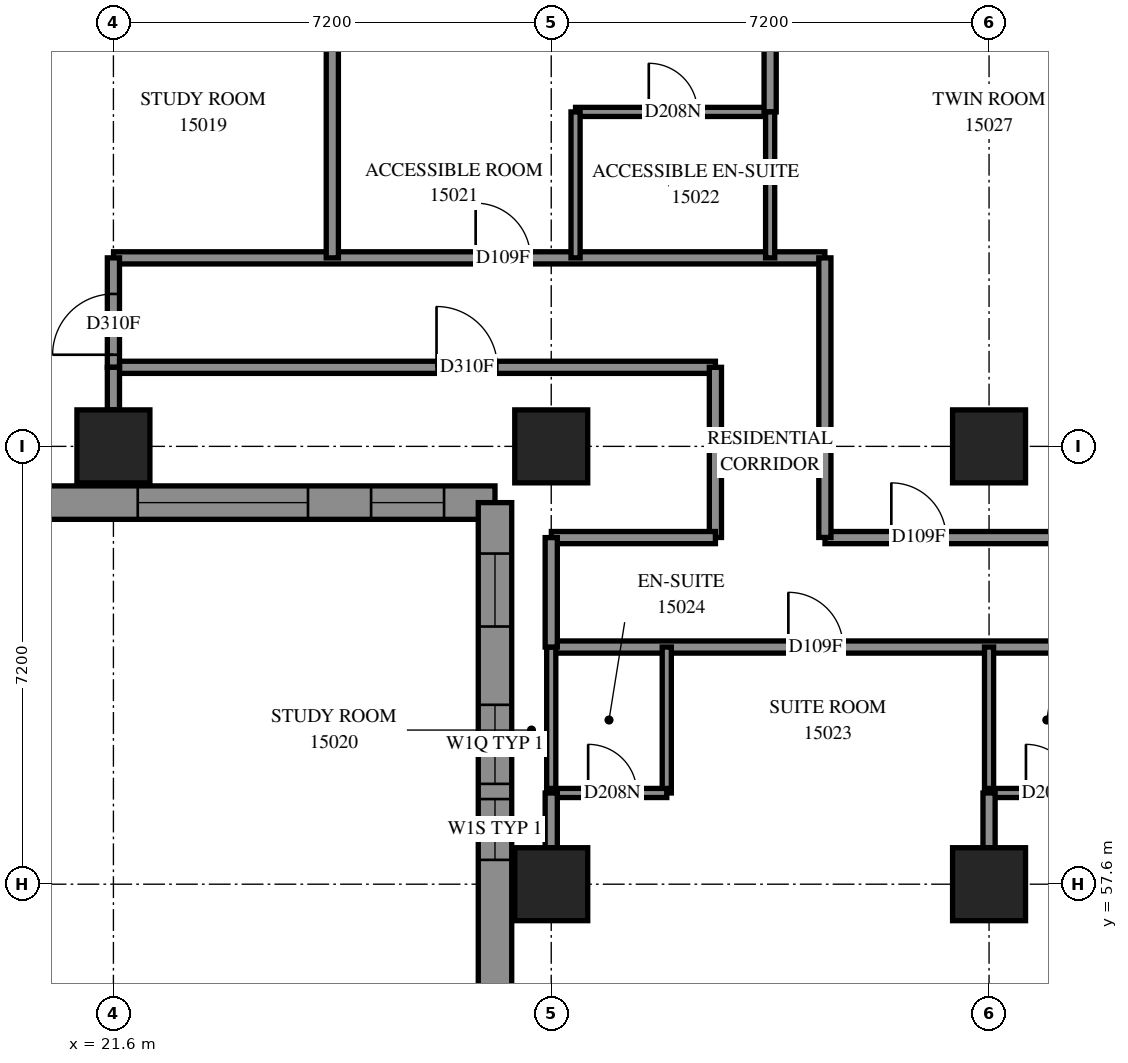
"""IFC4 building model, lengths in metres.
Left out: names, types, materials, properties, quantities, classifications, styles, units other than length and angle.
Written with IfcOpenShell. Run it as: python <this file> out.ifc"""

import sys

from ifc_helpers import new_model, si_unit, direction, frame, frame_2d, origin, origin_2d, place, context, subcontext, project, spatial, polyline, rectangle, outline, extrude, element, fill, save


model = new_model("IFC4")
c1 = context("Model", 3, precision=1e-05, world=origin(), true_north=direction((0.0, 1.0)))
c2 = subcontext(c1, "Body", "Model", "MODEL_VIEW")
j1 = project(units=[si_unit("LENGTHUNIT", "METRE"), si_unit("PLANEANGLEUNIT", "RADIAN")], contexts=[c1])
p1 = place(None, origin())
s1 = spatial("IfcSite", under=j1, at=p1, CompositionType="ELEMENT")
p2 = place(p1, origin())
s2 = spatial("IfcBuilding", under=s1, at=p2, CompositionType="ELEMENT")
p3 = place(p2, frame((0.0, 0.0, 57.6)))
s3 = spatial("IfcBuildingStorey", under=s2, at=p3, CompositionType="ELEMENT", Elevation=57.6)
for number, where, z_axis, x_axis in (
    (1, (21.6, 64.8, 0.0), (0.0, 0.0, 1.0), (1.0, 0.0, 0.0)),
    (2, (28.8, 57.6, 0.0), (0.0, 0.0, 1.0), (1.0, 0.0, 0.0)),
    (3, (28.8, 64.8, 0.0), (0.0, 0.0, 1.0), (1.0, 0.0, 0.0)),
    (4, (36.0, 57.6, 0.0), (0.0, 0.0, 1.0), (1.0, 0.0, 0.0)),
    (5, (36.0, 64.8, 0.0), (0.0, 0.0, 1.0), (1.0, 0.0, 0.0)),
):
    element("IfcColumn", number, at=place(p3, frame(where, z_axis=z_axis, x_axis=x_axis)), inside=s3, PredefinedType="COLUMN", context=c2, shape_type="SweptSolid", body=[
        extrude(rectangle(XDim=1.2, YDim=1.2, at=origin_2d()), origin(), (0.0, 0.0, 1.0), 3.1),
    ])
p4 = place(p3, frame((19.503, 63.875, 0.0), z_axis=(0.0, 0.0, 1.0), x_axis=(1.0, 0.0, 0.0)))
e6 = element("IfcWall", 6, at=p4, inside=s3, PredefinedType="SOLIDWALL", context=c2, shape_type="SweptSolid", body=[
    extrude(outline(polyline([(-0.275, -0.275), (8.097, -0.275), (8.647, 0.275), (0.275, 0.275), (-0.275, -0.275)])), origin(), (0.0, 0.0, 1.0), 3.1),
])
p5 = place(p4, frame((2.497, 0.0, 0.5)))
e7 = element("IfcOpeningElement", 7, at=p5, cuts=e6, PredefinedType="OPENING", context=c2, shape_type="SweptSolid", body=[
    extrude(rectangle(XDim=2.8, YDim=2.45, at=frame_2d((1.4, 1.225))), frame((0.0, 0.285, 0.0), z_axis=(0.0, -1.0, 0.0), x_axis=(1.0, 0.0, 0.0)), (0.0, 0.0, 1.0), 0.57),
])
p6 = place(p4, frame((6.335, 0.0, 0.5)))
e8 = element("IfcOpeningElement", 8, at=p6, cuts=e6, PredefinedType="OPENING", context=c2, shape_type="SweptSolid", body=[
    extrude(rectangle(XDim=1.2, YDim=2.45, at=frame_2d((0.6, 1.225))), frame((0.0, 0.285, 0.0), z_axis=(0.0, -1.0, 0.0), x_axis=(1.0, 0.0, 0.0)), (0.0, 0.0, 1.0), 0.57),
])
p7 = place(p3, frame((27.875, 63.875, 0.0), z_axis=(0.0, 0.0, 1.0), x_axis=(0.0, -1.0, 0.0)))
e9 = element("IfcWall", 9, at=p7, inside=s3, PredefinedType="SOLIDWALL", context=c2, shape_type="SweptSolid", body=[
    extrude(outline(polyline([(0.275, -0.275), (8.647, -0.275), (8.097, 0.275), (-0.275, 0.275), (0.275, -0.275)])), origin(), (0.0, 0.0, 1.0), 3.1),
])
p8 = place(p7, frame((0.838, 0.0, 0.5)))
e10 = element("IfcOpeningElement", 10, at=p8, cuts=e9, PredefinedType="OPENING", context=c2, shape_type="SweptSolid", body=[
    extrude(rectangle(XDim=1.2, YDim=2.45, at=frame_2d((0.6, 1.225))), frame((0.0, 0.285, 0.0), z_axis=(0.0, -1.0, 0.0), x_axis=(1.0, 0.0, 0.0)), (0.0, 0.0, 1.0), 0.57),
])
p9 = place(p7, frame((3.325, 0.0, 0.45)))
e11 = element("IfcOpeningElement", 11, at=p9, cuts=e9, PredefinedType="OPENING", context=c2, shape_type="SweptSolid", body=[
    extrude(rectangle(XDim=1.3, YDim=2.5, at=frame_2d((0.65, 1.25))), frame((0.0, 0.285, 0.0), z_axis=(0.0, -1.0, 0.0), x_axis=(1.0, 0.0, 0.0)), (0.0, 0.0, 1.0), 0.57),
])
p10 = place(p7, frame((4.875, 0.0, 0.45)))
e12 = element("IfcOpeningElement", 12, at=p10, cuts=e9, PredefinedType="OPENING", context=c2, shape_type="SweptSolid", body=[
    extrude(rectangle(XDim=1.0, YDim=2.5, at=frame_2d((0.5, 1.25))), frame((0.0, 0.285, 0.0), z_axis=(0.0, -1.0, 0.0), x_axis=(1.0, 0.0, 0.0)), (0.0, 0.0, 1.0), 0.57),
])
p11 = place(p3, frame((28.8, 61.5, 0.0), z_axis=(0.0, 0.0, 1.0), x_axis=(1.0, 0.0, 0.0)))
e13 = element("IfcWall", 13, at=p11, inside=s3, PredefinedType="PARTITIONING", context=c2, shape_type="SweptSolid", body=[
    extrude(rectangle(XDim=24.3, YDim=0.2, at=frame_2d((12.15, 0.0))), origin(), (0.0, 0.0, 1.0), 3.1),
])
p12 = place(p11, frame((3.899, 0.0, 0.0)))
e14 = element("IfcOpeningElement", 14, at=p12, cuts=e13, PredefinedType="OPENING", context=c2, shape_type="SweptSolid", body=[
    extrude(rectangle(XDim=0.9, YDim=2.1, at=frame_2d((0.45, 1.05))), frame((0.0, 0.11, 0.0), z_axis=(0.0, -1.0, 0.0), x_axis=(1.0, 0.0, 0.0)), (0.0, 0.0, 1.0), 0.22),
])
p13 = place(p11, frame((9.5, 0.0, 0.0)))
e15 = element("IfcOpeningElement", 15, at=p13, cuts=e13, PredefinedType="OPENING", context=c2, shape_type="SweptSolid", body=[
    extrude(rectangle(XDim=0.9, YDim=2.1, at=frame_2d((0.45, 1.05))), frame((0.0, 0.11, 0.0), z_axis=(0.0, -1.0, 0.0), x_axis=(1.0, 0.0, 0.0)), (0.0, 0.0, 1.0), 0.22),
])
p14 = place(p11, frame((11.307, 0.0, 0.0)))
e16 = element("IfcOpeningElement", 16, at=p14, cuts=e13, PredefinedType="OPENING", context=c2, shape_type="SweptSolid", body=[
    extrude(rectangle(XDim=1.0, YDim=2.1, at=frame_2d((0.5, 1.05))), frame((0.0, 0.11, 0.0), z_axis=(0.0, -1.0, 0.0), x_axis=(1.0, 0.0, 0.0)), (0.0, 0.0, 1.0), 0.22),
])
p15 = place(p11, frame((16.7, 0.0, 0.0)))
e17 = element("IfcOpeningElement", 17, at=p15, cuts=e13, PredefinedType="OPENING", context=c2, shape_type="SweptSolid", body=[
    extrude(rectangle(XDim=0.9, YDim=2.1, at=frame_2d((0.45, 1.05))), frame((0.0, 0.11, 0.0), z_axis=(0.0, -1.0, 0.0), x_axis=(1.0, 0.0, 0.0)), (0.0, 0.0, 1.0), 0.22),
])
p16 = place(p11, frame((18.508, 0.0, 0.0)))
e18 = element("IfcOpeningElement", 18, at=p16, cuts=e13, PredefinedType="OPENING", context=c2, shape_type="SweptSolid", body=[
    extrude(rectangle(XDim=1.0, YDim=2.1, at=frame_2d((0.5, 1.05))), frame((0.0, 0.11, 0.0), z_axis=(0.0, -1.0, 0.0), x_axis=(1.0, 0.0, 0.0)), (0.0, 0.0, 1.0), 0.22),
])
p17 = place(p11, frame((23.033, 0.0, 0.0)))
e19 = element("IfcOpeningElement", 19, at=p17, cuts=e13, PredefinedType="OPENING", context=c2, shape_type="SweptSolid", body=[
    extrude(rectangle(XDim=1.0, YDim=2.1, at=frame_2d((0.5, 1.05))), frame((0.0, 0.11, 0.0), z_axis=(0.0, -1.0, 0.0), x_axis=(1.0, 0.0, 0.0)), (0.0, 0.0, 1.0), 0.22),
])
p18 = place(p3, frame((33.302, 63.3, 0.0), z_axis=(0.0, 0.0, 1.0), x_axis=(1.0, 0.0, 0.0)))
e20 = element("IfcWall", 20, at=p18, inside=s3, PredefinedType="PARTITIONING", context=c2, shape_type="SweptSolid", body=[
    extrude(rectangle(XDim=21.798, YDim=0.2, at=frame_2d((10.899, 0.0))), origin(), (0.0, 0.0, 1.0), 3.1),
])
p19 = place(p18, frame((1.091, 0.0, 0.0)))
e21 = element("IfcOpeningElement", 21, at=p19, cuts=e20, PredefinedType="OPENING", context=c2, shape_type="SweptSolid", body=[
    extrude(rectangle(XDim=0.9, YDim=2.1, at=frame_2d((0.45, 1.05))), frame((0.0, 0.11, 0.0), z_axis=(0.0, -1.0, 0.0), x_axis=(1.0, 0.0, 0.0)), (0.0, 0.0, 1.0), 0.22),
])
p20 = place(p18, frame((8.248, 0.0, 0.0)))
e22 = element("IfcOpeningElement", 22, at=p20, cuts=e20, PredefinedType="OPENING", context=c2, shape_type="SweptSolid", body=[
    extrude(rectangle(XDim=0.9, YDim=2.1, at=frame_2d((0.45, 1.05))), frame((0.0, 0.11, 0.0), z_axis=(0.0, -1.0, 0.0), x_axis=(1.0, 0.0, 0.0)), (0.0, 0.0, 1.0), 0.22),
])
p21 = place(p18, frame((15.448, 0.0, 0.0)))
e23 = element("IfcOpeningElement", 23, at=p21, cuts=e20, PredefinedType="OPENING", context=c2, shape_type="SweptSolid", body=[
    extrude(rectangle(XDim=0.9, YDim=2.1, at=frame_2d((0.45, 1.05))), frame((0.0, 0.11, 0.0), z_axis=(0.0, -1.0, 0.0), x_axis=(1.0, 0.0, 0.0)), (0.0, 0.0, 1.0), 0.22),
])
p22 = place(p3, frame((21.602, 67.9, 0.0), z_axis=(0.0, 0.0, 1.0), x_axis=(1.0, 0.0, 0.0)))
e24 = element("IfcWall", 24, at=p22, inside=s3, PredefinedType="PARTITIONING", context=c2, shape_type="SweptSolid", body=[
    extrude(rectangle(XDim=11.698, YDim=0.2, at=frame_2d((5.849, 0.0))), origin(), (0.0, 0.0, 1.0), 3.1),
])
p23 = place(p22, frame((5.955, 0.0, 0.0)))
e25 = element("IfcOpeningElement", 25, at=p23, cuts=e24, PredefinedType="OPENING", context=c2, shape_type="SweptSolid", body=[
    extrude(rectangle(XDim=0.9, YDim=2.1, at=frame_2d((0.45, 1.05))), frame((0.0, 0.11, 0.0), z_axis=(0.0, -1.0, 0.0), x_axis=(1.0, 0.0, 0.0)), (0.0, 0.0, 1.0), 0.22),
])
p24 = place(p3, frame((21.6, 66.1, 0.0), z_axis=(0.0, 0.0, 1.0), x_axis=(1.0, 0.0, 0.0)))
e26 = element("IfcWall", 26, at=p24, inside=s3, PredefinedType="PARTITIONING", context=c2, shape_type="SweptSolid", body=[
    extrude(rectangle(XDim=9.9, YDim=0.2, at=frame_2d((4.95, 0.0))), origin(), (0.0, 0.0, 1.0), 3.1),
])
p25 = place(p24, frame((5.314, 0.0, 0.0)))
e27 = element("IfcOpeningElement", 27, at=p25, cuts=e26, PredefinedType="OPENING", context=c2, shape_type="SweptSolid", body=[
    extrude(rectangle(XDim=1.0, YDim=2.1, at=frame_2d((0.5, 1.05))), frame((0.0, 0.11, 0.0), z_axis=(0.0, -1.0, 0.0), x_axis=(1.0, 0.0, 0.0)), (0.0, 0.0, 1.0), 0.22),
])
p26 = place(p3, frame((25.2, 67.9, 0.0), z_axis=(0.0, 0.0, 1.0), x_axis=(0.0, 1.0, 0.0)))
e28 = element("IfcWall", 28, at=p26, inside=s3, PredefinedType="PARTITIONING", context=c2, shape_type="SweptSolid", body=[
    extrude(rectangle(XDim=5.069, YDim=0.2, at=frame_2d((2.534, 0.0))), origin(), (0.0, 0.0, 1.0), 3.1),
])
p27 = place(p3, frame((33.3, 63.302, 0.0), z_axis=(0.0, 0.0, 1.0), x_axis=(0.0, 1.0, 0.0)))
e29 = element("IfcWall", 29, at=p27, inside=s3, PredefinedType="PARTITIONING", context=c2, shape_type="SweptSolid", body=[
    extrude(rectangle(XDim=4.598, YDim=0.2, at=frame_2d((2.299, 0.0))), origin(), (0.0, 0.0, 1.0), 3.1),
])
p28 = place(p3, frame((29.2, 70.3, 0.0), z_axis=(0.0, 0.0, 1.0), x_axis=(1.0, 0.0, 0.0)))
e30 = element("IfcWall", 30, at=p28, inside=s3, PredefinedType="PARTITIONING", context=c2, shape_type="SweptSolid", body=[
    extrude(rectangle(XDim=3.2, YDim=0.15, at=frame_2d((1.6, 0.0))), origin(), (0.0, 0.0, 1.0), 3.1),
])
p29 = place(p28, frame((1.204, 0.0, 0.0)))
e31 = element("IfcOpeningElement", 31, at=p29, cuts=e30, PredefinedType="OPENING", context=c2, shape_type="SweptSolid", body=[
    extrude(rectangle(XDim=0.8, YDim=2.1, at=frame_2d((0.4, 1.05))), frame((0.0, 0.085, 0.0), z_axis=(0.0, -1.0, 0.0), x_axis=(1.0, 0.0, 0.0)), (0.0, 0.0, 1.0), 0.17),
])
p30 = place(p3, frame((31.5, 63.302, 0.0), z_axis=(0.0, 0.0, 1.0), x_axis=(0.0, 1.0, 0.0)))
e32 = element("IfcWall", 32, at=p30, inside=s3, PredefinedType="PARTITIONING", context=c2, shape_type="SweptSolid", body=[
    extrude(rectangle(XDim=2.798, YDim=0.2, at=frame_2d((1.399, 0.0))), origin(), (0.0, 0.0, 1.0), 3.1),
])
p31 = place(p3, frame((28.802, 63.3, 0.0), z_axis=(0.0, 0.0, 1.0), x_axis=(1.0, 0.0, 0.0)))
e33 = element("IfcWall", 33, at=p31, inside=s3, PredefinedType="PARTITIONING", context=c2, shape_type="SweptSolid", body=[
    extrude(rectangle(XDim=2.698, YDim=0.2, at=frame_2d((1.349, 0.0))), origin(), (0.0, 0.0, 1.0), 3.1),
])
p32 = place(p3, frame((32.4, 70.3, 0.0), z_axis=(0.0, 0.0, 1.0), x_axis=(0.0, 1.0, 0.0)))
e34 = element("IfcWall", 34, at=p32, inside=s3, PredefinedType="PARTITIONING", context=c2, shape_type="SweptSolid", body=[
    extrude(rectangle(XDim=2.606, YDim=0.2, at=frame_2d((1.303, 0.0))), origin(), (0.0, 0.0, 1.0), 3.1),
])
p33 = place(p3, frame((30.7, 59.1, 0.0), z_axis=(0.0, 0.0, 1.0), x_axis=(0.0, 1.0, 0.0)))
e35 = element("IfcWall", 35, at=p33, inside=s3, PredefinedType="PARTITIONING", context=c2, shape_type="SweptSolid", body=[
    extrude(rectangle(XDim=2.4, YDim=0.15, at=frame_2d((1.2, 0.0))), origin(), (0.0, 0.0, 1.0), 3.1),
])
p34 = place(p3, frame((28.8, 59.1, 0.0), z_axis=(0.0, 0.0, 1.0), x_axis=(0.0, 1.0, 0.0)))
e36 = element("IfcWall", 36, at=p34, inside=s3, PredefinedType="PARTITIONING", context=c2, shape_type="SweptSolid", body=[
    extrude(rectangle(XDim=2.4, YDim=0.15, at=frame_2d((1.2, 0.0))), origin(), (0.0, 0.0, 1.0), 2.6),
])
for number, where, z_axis, x_axis in (
    (37, (36.0, 59.1, 0.0), (0.0, 0.0, 1.0), (0.0, 1.0, 0.0)),
    (38, (29.2, 67.9, 0.0), (0.0, 0.0, 1.0), (0.0, 1.0, 0.0)),
    (39, (32.4, 67.9, 0.0), (0.0, 0.0, 1.0), (0.0, 1.0, 0.0)),
):
    element("IfcWall", number, at=place(p3, frame(where, z_axis=z_axis, x_axis=x_axis)), inside=s3, PredefinedType="PARTITIONING", context=c2, shape_type="SweptSolid", body=[
        extrude(rectangle(XDim=2.4, YDim=0.15, at=frame_2d((1.2, 0.0))), origin(), (0.0, 0.0, 1.0), 3.1),
    ])
p35 = place(p3, frame((28.8, 59.1, 0.0), z_axis=(0.0, 0.0, 1.0), x_axis=(1.0, 0.0, 0.0)))
e40 = element("IfcWall", 40, at=p35, inside=s3, PredefinedType="PARTITIONING", context=c2, shape_type="SweptSolid", body=[
    extrude(rectangle(XDim=1.9, YDim=0.15, at=frame_2d((0.95, 0.0))), origin(), (0.0, 0.0, 1.0), 3.1),
])
p36 = place(p35, frame((0.607, 0.0, 0.0)))
e41 = element("IfcOpeningElement", 41, at=p36, cuts=e40, PredefinedType="OPENING", context=c2, shape_type="SweptSolid", body=[
    extrude(rectangle(XDim=0.8, YDim=2.1, at=frame_2d((0.4, 1.05))), frame((0.0, 0.085, 0.0), z_axis=(0.0, -1.0, 0.0), x_axis=(1.0, 0.0, 0.0)), (0.0, 0.0, 1.0), 0.17),
])
p37 = place(p3, frame((36.0, 59.1, 0.0), z_axis=(0.0, 0.0, 1.0), x_axis=(1.0, 0.0, 0.0)))
e42 = element("IfcWall", 42, at=p37, inside=s3, PredefinedType="PARTITIONING", context=c2, shape_type="SweptSolid", body=[
    extrude(rectangle(XDim=1.9, YDim=0.15, at=frame_2d((0.95, 0.0))), origin(), (0.0, 0.0, 1.0), 3.1),
])
p38 = place(p37, frame((0.607, 0.0, 0.0)))
e43 = element("IfcOpeningElement", 43, at=p38, cuts=e42, PredefinedType="OPENING", context=c2, shape_type="SweptSolid", body=[
    extrude(rectangle(XDim=0.8, YDim=2.1, at=frame_2d((0.4, 1.05))), frame((0.0, 0.085, 0.0), z_axis=(0.0, -1.0, 0.0), x_axis=(1.0, 0.0, 0.0)), (0.0, 0.0, 1.0), 0.17),
])
p39 = place(p3, frame((21.6, 66.1, 0.0), z_axis=(0.0, 0.0, 1.0), x_axis=(0.0, 1.0, 0.0)))
e44 = element("IfcWall", 44, at=p39, inside=s3, PredefinedType="PARTITIONING", context=c2, shape_type="SweptSolid", body=[
    extrude(rectangle(XDim=1.8, YDim=0.2, at=frame_2d((0.9, 0.0))), origin(), (0.0, 0.0, 1.0), 2.6),
])
p40 = place(p39, frame((0.207, 0.0, 0.0)))
e45 = element("IfcOpeningElement", 45, at=p40, cuts=e44, PredefinedType="OPENING", context=c2, shape_type="SweptSolid", body=[
    extrude(rectangle(XDim=1.0, YDim=2.1, at=frame_2d((0.5, 1.05))), frame((0.0, 0.11, 0.0), z_axis=(0.0, -1.0, 0.0), x_axis=(1.0, 0.0, 0.0)), (0.0, 0.0, 1.0), 0.22),
])
p41 = place(p3, frame((28.8, 61.5, 0.0), z_axis=(0.0, 0.0, 1.0), x_axis=(0.0, 1.0, 0.0)))
e46 = element("IfcWall", 46, at=p41, inside=s3, PredefinedType="PARTITIONING", context=c2, shape_type="SweptSolid", body=[
    extrude(rectangle(XDim=1.8, YDim=0.2, at=frame_2d((0.9, 0.0))), origin(), (0.0, 0.0, 1.0), 2.6),
])
p42 = place(p3, frame((28.8, 58.2, 0.0), z_axis=(0.0, 0.0, 1.0), x_axis=(0.0, 1.0, 0.0)))
e47 = element("IfcWall", 47, at=p42, inside=s3, PredefinedType="PARTITIONING", context=c2, shape_type="SweptSolid", body=[
    extrude(rectangle(XDim=0.9, YDim=0.2, at=frame_2d((0.45, 0.0))), origin(), (0.0, 0.0, 1.0), 2.6),
])
p43 = place(p3, frame((36.0, 58.2, 0.0), z_axis=(0.0, 0.0, 1.0), x_axis=(0.0, 1.0, 0.0)))
e48 = element("IfcWall", 48, at=p43, inside=s3, PredefinedType="PARTITIONING", context=c2, shape_type="SweptSolid", body=[
    extrude(rectangle(XDim=0.9, YDim=0.2, at=frame_2d((0.45, 0.0))), origin(), (0.0, 0.0, 1.0), 3.1),
])
p44 = place(p3, frame((21.6, 65.4, 0.0), z_axis=(0.0, 0.0, 1.0), x_axis=(0.0, 1.0, 0.0)))
e49 = element("IfcWall", 49, at=p44, inside=s3, PredefinedType="PARTITIONING", context=c2, shape_type="SweptSolid", body=[
    extrude(rectangle(XDim=0.7, YDim=0.2, at=frame_2d((0.35, 0.0))), origin(), (0.0, 0.0, 1.0), 2.6),
])
p45 = place(p5, origin())
e50 = element("IfcWindow", 50, at=p45, inside=s3, PartitioningType="SINGLE_PANEL", PredefinedType="WINDOW", context=c2, shape_type="SweptSolid", body=[
    extrude(rectangle(XDim=2.8, YDim=2.45, at=frame_2d((1.4, 1.225))), frame((0.0, 0.155, 0.0), z_axis=(0.0, -1.0, 0.0), x_axis=(1.0, 0.0, 0.0)), (0.0, 0.0, 1.0), 0.06),
])
fill(e7, e50)
p46 = place(p6, origin())
e51 = element("IfcWindow", 51, at=p46, inside=s3, PartitioningType="SINGLE_PANEL", PredefinedType="WINDOW", context=c2, shape_type="SweptSolid", body=[
    extrude(rectangle(XDim=1.2, YDim=2.45, at=frame_2d((0.6, 1.225))), frame((0.0, 0.155, 0.0), z_axis=(0.0, -1.0, 0.0), x_axis=(1.0, 0.0, 0.0)), (0.0, 0.0, 1.0), 0.06),
])
fill(e8, e51)
p47 = place(p8, origin())
e52 = element("IfcWindow", 52, at=p47, inside=s3, PartitioningType="SINGLE_PANEL", PredefinedType="WINDOW", context=c2, shape_type="SweptSolid", body=[
    extrude(rectangle(XDim=1.2, YDim=2.45, at=frame_2d((0.6, 1.225))), frame((0.0, 0.155, 0.0), z_axis=(0.0, -1.0, 0.0), x_axis=(1.0, 0.0, 0.0)), (0.0, 0.0, 1.0), 0.06),
])
fill(e10, e52)
p48 = place(p40, origin())
e53 = element("IfcDoor", 53, at=p48, inside=s3, OperationType="SINGLE_SWING_RIGHT", PredefinedType="DOOR", context=c2, shape_type="SweptSolid", body=[
    extrude(rectangle(XDim=1.0, YDim=2.1, at=frame_2d((0.5, 1.05))), frame((0.0, 0.025, 0.0), z_axis=(0.0, -1.0, 0.0), x_axis=(1.0, 0.0, 0.0)), (0.0, 0.0, 1.0), 0.05),
])
fill(e45, e53)
p49 = place(p25, origin())
e54 = element("IfcDoor", 54, at=p49, inside=s3, OperationType="SINGLE_SWING_LEFT", PredefinedType="DOOR", context=c2, shape_type="SweptSolid", body=[
    extrude(rectangle(XDim=1.0, YDim=2.1, at=frame_2d((0.5, 1.05))), frame((0.0, 0.025, 0.0), z_axis=(0.0, -1.0, 0.0), x_axis=(1.0, 0.0, 0.0)), (0.0, 0.0, 1.0), 0.05),
])
fill(e27, e54)
p50 = place(p23, origin())
e55 = element("IfcDoor", 55, at=p50, inside=s3, OperationType="SINGLE_SWING_LEFT", PredefinedType="DOOR", context=c2, shape_type="SweptSolid", body=[
    extrude(rectangle(XDim=0.9, YDim=2.1, at=frame_2d((0.45, 1.05))), frame((0.0, 0.025, 0.0), z_axis=(0.0, -1.0, 0.0), x_axis=(1.0, 0.0, 0.0)), (0.0, 0.0, 1.0), 0.05),
])
fill(e25, e55)
p51 = place(p29, origin())
e56 = element("IfcDoor", 56, at=p51, inside=s3, OperationType="SINGLE_SWING_RIGHT", PredefinedType="DOOR", context=c2, shape_type="SweptSolid", body=[
    extrude(rectangle(XDim=0.8, YDim=2.1, at=frame_2d((0.4, 1.05))), frame((0.0, 0.025, 0.0), z_axis=(0.0, -1.0, 0.0), x_axis=(1.0, 0.0, 0.0)), (0.0, 0.0, 1.0), 0.05),
])
fill(e31, e56)
p52 = place(p12, origin())
e57 = element("IfcDoor", 57, at=p52, inside=s3, OperationType="SINGLE_SWING_LEFT", PredefinedType="DOOR", context=c2, shape_type="SweptSolid", body=[
    extrude(rectangle(XDim=0.9, YDim=2.1, at=frame_2d((0.45, 1.05))), frame((0.0, 0.025, 0.0), z_axis=(0.0, -1.0, 0.0), x_axis=(1.0, 0.0, 0.0)), (0.0, 0.0, 1.0), 0.05),
])
fill(e14, e57)
p53 = place(p36, origin())
e58 = element("IfcDoor", 58, at=p53, inside=s3, OperationType="SINGLE_SWING_RIGHT", PredefinedType="DOOR", context=c2, shape_type="SweptSolid", body=[
    extrude(rectangle(XDim=0.8, YDim=2.1, at=frame_2d((0.4, 1.05))), frame((0.0, 0.025, 0.0), z_axis=(0.0, -1.0, 0.0), x_axis=(1.0, 0.0, 0.0)), (0.0, 0.0, 1.0), 0.05),
])
fill(e41, e58)
p54 = place(p38, origin())
e59 = element("IfcDoor", 59, at=p54, inside=s3, OperationType="SINGLE_SWING_RIGHT", PredefinedType="DOOR", context=c2, shape_type="SweptSolid", body=[
    extrude(rectangle(XDim=0.8, YDim=2.1, at=frame_2d((0.4, 1.05))), frame((0.0, 0.025, 0.0), z_axis=(0.0, -1.0, 0.0), x_axis=(1.0, 0.0, 0.0)), (0.0, 0.0, 1.0), 0.05),
])
fill(e43, e59)
p55 = place(p19, origin())
e60 = element("IfcDoor", 60, at=p55, inside=s3, OperationType="SINGLE_SWING_LEFT", PredefinedType="DOOR", context=c2, shape_type="SweptSolid", body=[
    extrude(rectangle(XDim=0.9, YDim=2.1, at=frame_2d((0.45, 1.05))), frame((0.0, 0.025, 0.0), z_axis=(0.0, -1.0, 0.0), x_axis=(1.0, 0.0, 0.0)), (0.0, 0.0, 1.0), 0.05),
])
fill(e21, e60)
p56 = place(p9, origin())
e61 = element("IfcWindow", 61, at=p56, inside=s3, PartitioningType="SINGLE_PANEL", PredefinedType="WINDOW", context=c2, shape_type="SweptSolid", body=[
    extrude(rectangle(XDim=1.3, YDim=2.5, at=frame_2d((0.65, 1.25))), frame((0.0, 0.155, 0.0), z_axis=(0.0, -1.0, 0.0), x_axis=(1.0, 0.0, 0.0)), (0.0, 0.0, 1.0), 0.06),
])
fill(e11, e61)
p57 = place(p10, origin())
e62 = element("IfcWindow", 62, at=p57, inside=s3, PartitioningType="SINGLE_PANEL", PredefinedType="WINDOW", context=c2, shape_type="SweptSolid", body=[
    extrude(rectangle(XDim=1.0, YDim=2.5, at=frame_2d((0.5, 1.25))), frame((0.0, 0.155, 0.0), z_axis=(0.0, -1.0, 0.0), x_axis=(1.0, 0.0, 0.0)), (0.0, 0.0, 1.0), 0.06),
])
fill(e12, e62)
save(model, sys.argv[1])
